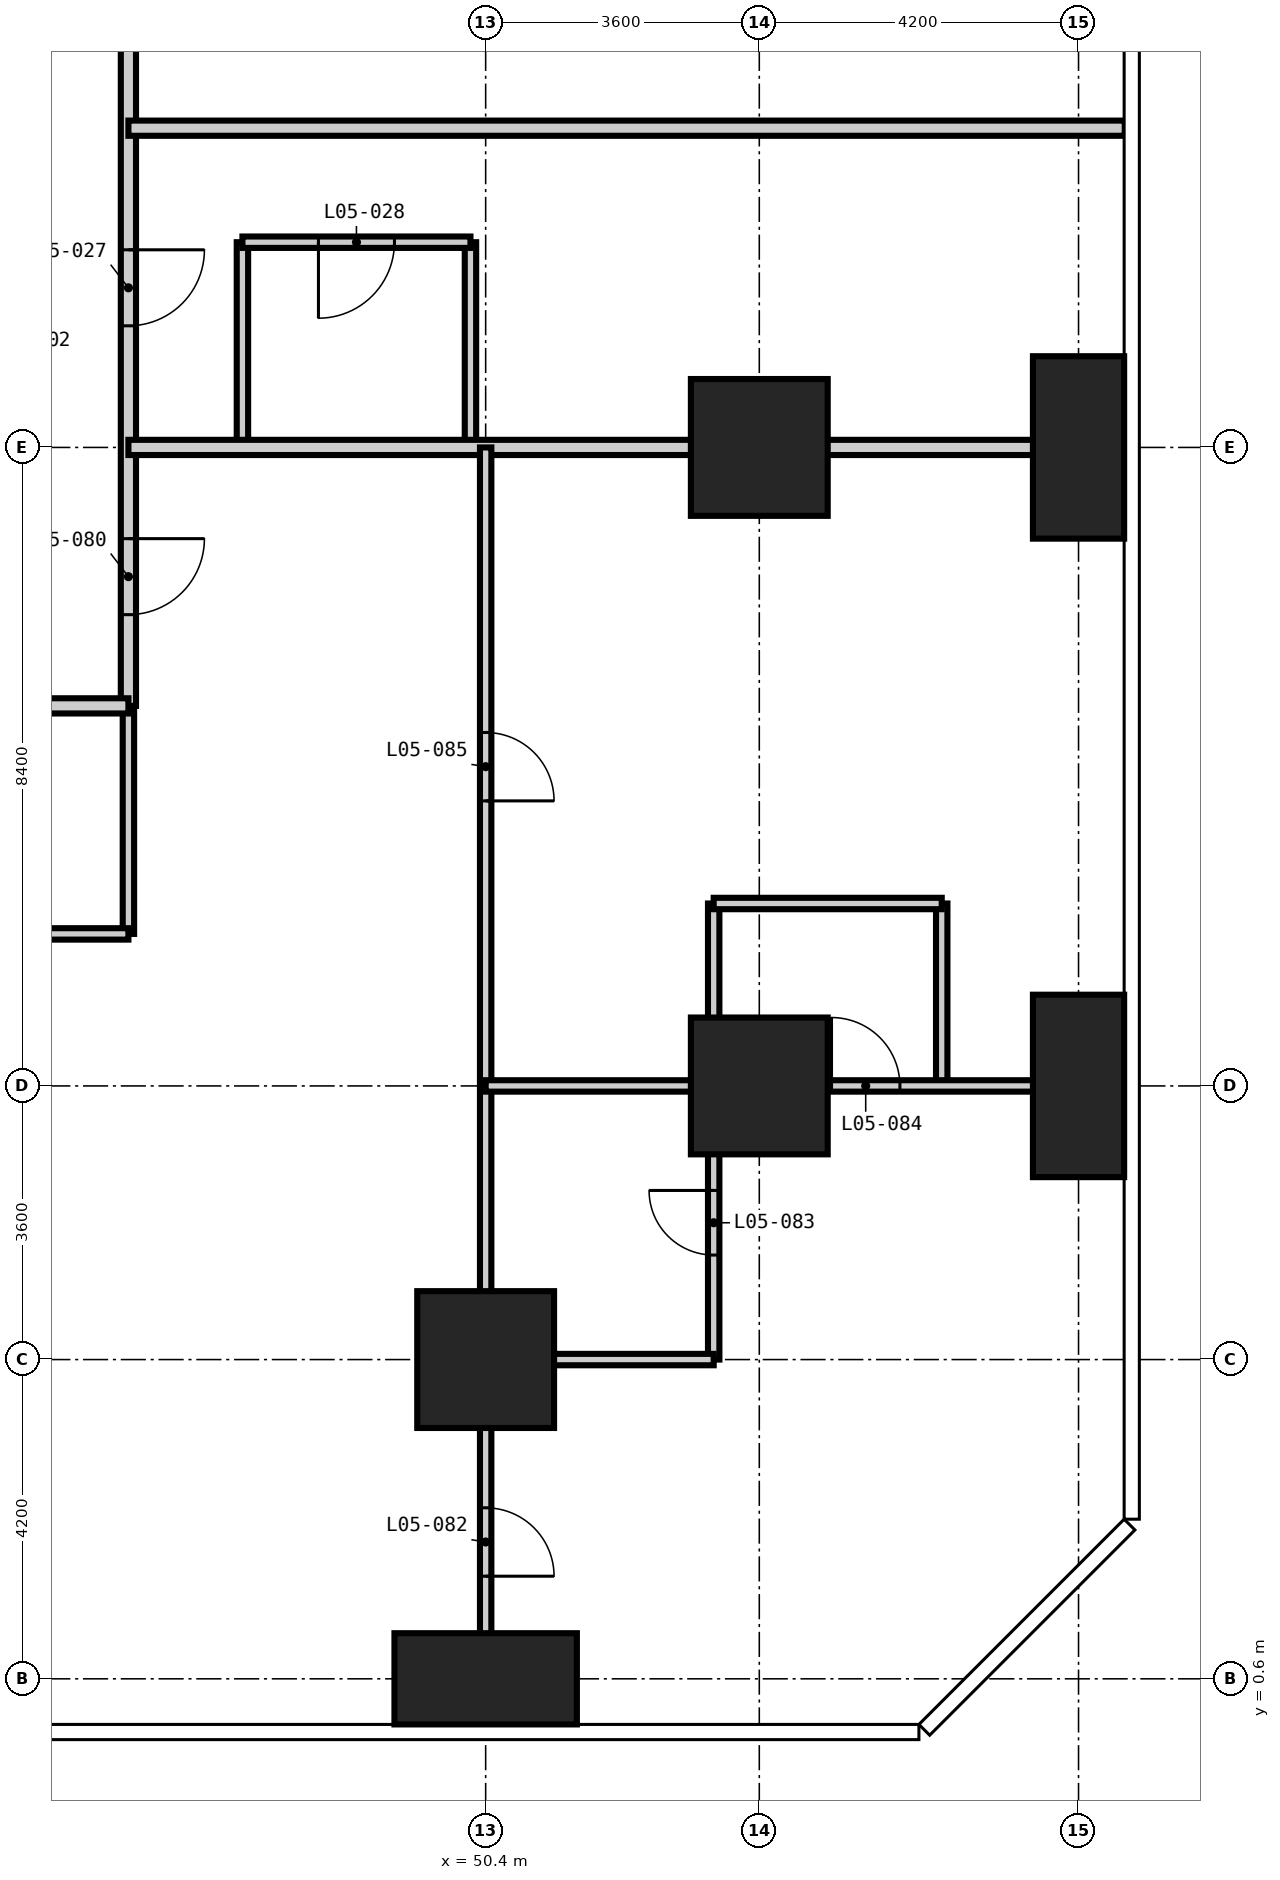
"""IFC4 building model, lengths in metres.
Left out: names, types, materials, properties, quantities, classifications, styles, units other than length and angle.
Written with IfcOpenShell. Run it as: python <this file> out.ifc"""

import sys

from ifc_helpers import new_model, si_unit, direction, frame, frame_2d, origin, origin_2d, place, context, subcontext, project, spatial, rectangle, extrude, element, fill, save


model = new_model("IFC4")
c1 = context("Model", 3, precision=1e-05, world=origin(), true_north=direction((0.0, 1.0)))
c2 = subcontext(c1, "Body", "Model", "MODEL_VIEW")
j1 = project(units=[si_unit("LENGTHUNIT", "METRE"), si_unit("PLANEANGLEUNIT", "RADIAN")], contexts=[c1])
p1 = place(None, origin())
s1 = spatial("IfcSite", under=j1, at=p1, CompositionType="ELEMENT")
p2 = place(p1, origin())
s2 = spatial("IfcBuilding", under=s1, at=p2, CompositionType="ELEMENT")
p3 = place(p2, frame((0.0, 0.0, 27.0)))
s3 = spatial("IfcBuildingStorey", under=s2, at=p3, CompositionType="ELEMENT", Elevation=27.0)
p4 = place(p3, frame((50.4, 0.6, -0.35), z_axis=(0.0, 0.0, 1.0), x_axis=(1.0, 0.0, 0.0)))
e1 = element("IfcColumn", 1, at=p4, inside=s3, PredefinedType="COLUMN", context=c2, shape_type="SweptSolid", body=[
    extrude(rectangle(XDim=2.4, YDim=1.2, at=origin_2d()), origin(), (0.0, 0.0, 1.0), 3.6),
])
for number, where, z_axis, x_axis in (
    (2, (50.4, 4.8, -0.35), (0.0, 0.0, 1.0), (1.0, 0.0, 0.0)),
    (3, (54.0, 8.4, -0.35), (0.0, 0.0, 1.0), (1.0, 0.0, 0.0)),
    (4, (54.0, 16.8, -0.35), (0.0, 0.0, 1.0), (1.0, 0.0, 0.0)),
):
    element("IfcColumn", number, at=place(p3, frame(where, z_axis=z_axis, x_axis=x_axis)), inside=s3, PredefinedType="COLUMN", context=c2, shape_type="SweptSolid", body=[
        extrude(rectangle(XDim=1.8, YDim=1.8, at=origin_2d()), origin(), (0.0, 0.0, 1.0), 3.6),
    ])
for number, where, z_axis, x_axis in (
    (5, (58.2, 8.4, -0.35), (0.0, 0.0, 1.0), (1.0, 0.0, 0.0)),
    (6, (58.2, 16.8, -0.35), (0.0, 0.0, 1.0), (1.0, 0.0, 0.0)),
):
    element("IfcColumn", number, at=place(p3, frame(where, z_axis=z_axis, x_axis=x_axis)), inside=s3, PredefinedType="COLUMN", context=c2, shape_type="SweptSolid", body=[
        extrude(rectangle(XDim=1.2, YDim=2.4, at=origin_2d()), origin(), (0.0, 0.0, 1.0), 3.6),
    ])
p5 = place(p3, frame((45.7, 10.4, 0.0), z_axis=(0.0, 0.0, 1.0), x_axis=(0.0, 1.0, 0.0)))
e7 = element("IfcWall", 7, at=p5, inside=s3, PredefinedType="PARTITIONING", context=c2, shape_type="SweptSolid", body=[
    extrude(rectangle(XDim=3.0, YDim=0.15, at=frame_2d((1.5, 0.0))), origin(), (0.0, 0.0, 1.0), 3.25),
])
for number, where, z_axis, x_axis in (
    (8, (47.2, 16.8, 0.0), (0.0, 0.0, 1.0), (0.0, 1.0, 0.0)),
    (9, (50.2, 16.8, 0.0), (0.0, 0.0, 1.0), (0.0, 1.0, 0.0)),
):
    element("IfcWall", number, at=place(p3, frame(where, z_axis=z_axis, x_axis=x_axis)), inside=s3, PredefinedType="PARTITIONING", context=c2, shape_type="SweptSolid", body=[
        extrude(rectangle(XDim=2.7, YDim=0.15, at=frame_2d((1.35, 0.0))), origin(), (0.0, 0.0, 1.0), 3.25),
    ])
p6 = place(p3, frame((53.4, 4.8, 0.0), z_axis=(0.0, 0.0, 1.0), x_axis=(0.0, 1.0, 0.0)))
e10 = element("IfcWall", 10, at=p6, inside=s3, PredefinedType="PARTITIONING", context=c2, shape_type="SweptSolid", body=[
    extrude(rectangle(XDim=3.6, YDim=0.15, at=frame_2d((1.8, 0.0))), origin(), (0.0, 0.0, 1.0), 3.25),
])
p7 = place(p6, frame((1.375, 0.0, 0.0)))
e11 = element("IfcOpeningElement", 11, at=p7, cuts=e10, PredefinedType="OPENING", context=c2, shape_type="SweptSolid", body=[
    extrude(rectangle(XDim=0.85, YDim=2.1, at=frame_2d((0.425, 1.05))), frame((0.0, 0.085, 0.0), z_axis=(0.0, -1.0, 0.0), x_axis=(1.0, 0.0, 0.0)), (0.0, 0.0, 1.0), 0.17),
])
p8 = place(p3, frame((50.4, 4.8, 0.0), z_axis=(0.0, 0.0, 1.0), x_axis=(1.0, 0.0, 0.0)))
e12 = element("IfcWall", 12, at=p8, inside=s3, PredefinedType="PARTITIONING", context=c2, shape_type="SweptSolid", body=[
    extrude(rectangle(XDim=3.0, YDim=0.15, at=frame_2d((1.5, 0.0))), origin(), (0.0, 0.0, 1.0), 3.25),
])
p9 = place(p3, frame((42.0, 10.4, 0.0), z_axis=(0.0, 0.0, 1.0), x_axis=(1.0, 0.0, 0.0)))
e13 = element("IfcWall", 13, at=p9, inside=s3, PredefinedType="PARTITIONING", context=c2, shape_type="SweptSolid", body=[
    extrude(rectangle(XDim=3.7, YDim=0.15, at=frame_2d((1.85, 0.0))), origin(), (0.0, 0.0, 1.0), 3.25),
])
p10 = place(p9, frame((1.425, 0.0, 0.0)))
e14 = element("IfcOpeningElement", 14, at=p10, cuts=e13, PredefinedType="OPENING", context=c2, shape_type="SweptSolid", body=[
    extrude(rectangle(XDim=0.85, YDim=2.1, at=frame_2d((0.425, 1.05))), frame((0.0, 0.085, 0.0), z_axis=(0.0, -1.0, 0.0), x_axis=(1.0, 0.0, 0.0)), (0.0, 0.0, 1.0), 0.17),
])
p11 = place(p3, frame((47.2, 19.5, 0.0), z_axis=(0.0, 0.0, 1.0), x_axis=(1.0, 0.0, 0.0)))
e15 = element("IfcWall", 15, at=p11, inside=s3, PredefinedType="PARTITIONING", context=c2, shape_type="SweptSolid", body=[
    extrude(rectangle(XDim=3.0, YDim=0.15, at=frame_2d((1.5, 0.0))), origin(), (0.0, 0.0, 1.0), 3.25),
])
p12 = place(p11, frame((1.0, 0.0, 0.0)))
e16 = element("IfcOpeningElement", 16, at=p12, cuts=e15, PredefinedType="OPENING", context=c2, shape_type="SweptSolid", body=[
    extrude(rectangle(XDim=1.0, YDim=2.1, at=frame_2d((0.5, 1.05))), frame((0.0, 0.085, 0.0), z_axis=(0.0, -1.0, 0.0), x_axis=(1.0, 0.0, 0.0)), (0.0, 0.0, 1.0), 0.17),
])
p13 = place(p3, frame((45.7, 46.0, 0.0), z_axis=(0.0, 0.0, 1.0), x_axis=(0.0, -1.0, 0.0)))
e17 = element("IfcWall", 17, at=p13, inside=s3, PredefinedType="PARTITIONING", context=c2, shape_type="SweptSolid", body=[
    extrude(rectangle(XDim=32.6, YDim=0.2, at=frame_2d((16.3, 0.0))), origin(), (0.0, 0.0, 1.0), 3.25),
])
p14 = place(p13, frame((26.6, 0.0, 0.0)))
e18 = element("IfcOpeningElement", 18, at=p14, cuts=e17, PredefinedType="OPENING", context=c2, shape_type="SweptSolid", body=[
    extrude(rectangle(XDim=1.0, YDim=2.2, at=frame_2d((0.5, 1.1))), frame((0.0, 0.11, 0.0), z_axis=(0.0, -1.0, 0.0), x_axis=(1.0, 0.0, 0.0)), (0.0, 0.0, 1.0), 0.22),
])
p15 = place(p13, frame((22.4, 0.0, 0.0)))
e19 = element("IfcOpeningElement", 19, at=p15, cuts=e17, PredefinedType="OPENING", context=c2, shape_type="SweptSolid", body=[
    extrude(rectangle(XDim=1.0, YDim=2.2, at=frame_2d((0.5, 1.1))), frame((0.0, 0.11, 0.0), z_axis=(0.0, -1.0, 0.0), x_axis=(1.0, 0.0, 0.0)), (0.0, 0.0, 1.0), 0.22),
])
p16 = place(p13, frame((17.0, 0.0, 0.0)))
e20 = element("IfcOpeningElement", 20, at=p16, cuts=e17, PredefinedType="OPENING", context=c2, shape_type="SweptSolid", body=[
    extrude(rectangle(XDim=1.0, YDim=2.2, at=frame_2d((0.5, 1.1))), frame((0.0, 0.11, 0.0), z_axis=(0.0, -1.0, 0.0), x_axis=(1.0, 0.0, 0.0)), (0.0, 0.0, 1.0), 0.22),
])
p17 = place(p13, frame((15.2, 0.0, 0.0)))
e21 = element("IfcOpeningElement", 21, at=p17, cuts=e17, PredefinedType="OPENING", context=c2, shape_type="SweptSolid", body=[
    extrude(rectangle(XDim=1.0, YDim=2.2, at=frame_2d((0.5, 1.1))), frame((0.0, 0.11, 0.0), z_axis=(0.0, -1.0, 0.0), x_axis=(1.0, 0.0, 0.0)), (0.0, 0.0, 1.0), 0.22),
])
p18 = place(p13, frame((8.6, 0.0, 0.0)))
e22 = element("IfcOpeningElement", 22, at=p18, cuts=e17, PredefinedType="OPENING", context=c2, shape_type="SweptSolid", body=[
    extrude(rectangle(XDim=1.0, YDim=2.2, at=frame_2d((0.5, 1.1))), frame((0.0, 0.11, 0.0), z_axis=(0.0, -1.0, 0.0), x_axis=(1.0, 0.0, 0.0)), (0.0, 0.0, 1.0), 0.22),
])
p19 = place(p13, frame((6.8, 0.0, 0.0)))
e23 = element("IfcOpeningElement", 23, at=p19, cuts=e17, PredefinedType="OPENING", context=c2, shape_type="SweptSolid", body=[
    extrude(rectangle(XDim=1.0, YDim=2.2, at=frame_2d((0.5, 1.1))), frame((0.0, 0.11, 0.0), z_axis=(0.0, -1.0, 0.0), x_axis=(1.0, 0.0, 0.0)), (0.0, 0.0, 1.0), 0.22),
])
p20 = place(p13, frame((30.4, 0.0, 0.0)))
e24 = element("IfcOpeningElement", 24, at=p20, cuts=e17, PredefinedType="OPENING", context=c2, shape_type="SweptSolid", body=[
    extrude(rectangle(XDim=1.0, YDim=2.2, at=frame_2d((0.5, 1.1))), frame((0.0, 0.11, 0.0), z_axis=(0.0, -1.0, 0.0), x_axis=(1.0, 0.0, 0.0)), (0.0, 0.0, 1.0), 0.22),
])
p21 = place(p13, frame((1.5, 0.0, 0.0)))
e25 = element("IfcOpeningElement", 25, at=p21, cuts=e17, PredefinedType="OPENING", context=c2, shape_type="SweptSolid", body=[
    extrude(rectangle(XDim=1.0, YDim=2.2, at=frame_2d((0.5, 1.1))), frame((0.0, 0.11, 0.0), z_axis=(0.0, -1.0, 0.0), x_axis=(1.0, 0.0, 0.0)), (0.0, 0.0, 1.0), 0.22),
])
p22 = place(p3, frame((45.7, 13.4, 0.0), z_axis=(0.0, 0.0, 1.0), x_axis=(-1.0, 0.0, 0.0)))
e26 = element("IfcWall", 26, at=p22, inside=s3, PredefinedType="PARTITIONING", context=c2, shape_type="SweptSolid", body=[
    extrude(rectangle(XDim=32.3, YDim=0.2, at=frame_2d((16.15, 0.0))), origin(), (0.0, 0.0, 1.0), 3.25),
])
p23 = place(p22, frame((25.1, 0.0, 0.0)))
e27 = element("IfcOpeningElement", 27, at=p23, cuts=e26, PredefinedType="OPENING", context=c2, shape_type="SweptSolid", body=[
    extrude(rectangle(XDim=1.0, YDim=2.2, at=frame_2d((0.5, 1.1))), frame((0.0, 0.11, 0.0), z_axis=(0.0, -1.0, 0.0), x_axis=(1.0, 0.0, 0.0)), (0.0, 0.0, 1.0), 0.22),
])
p24 = place(p22, frame((23.3, 0.0, 0.0)))
e28 = element("IfcOpeningElement", 28, at=p24, cuts=e26, PredefinedType="OPENING", context=c2, shape_type="SweptSolid", body=[
    extrude(rectangle(XDim=1.0, YDim=2.2, at=frame_2d((0.5, 1.1))), frame((0.0, 0.11, 0.0), z_axis=(0.0, -1.0, 0.0), x_axis=(1.0, 0.0, 0.0)), (0.0, 0.0, 1.0), 0.22),
])
p25 = place(p22, frame((16.7, 0.0, 0.0)))
e29 = element("IfcOpeningElement", 29, at=p25, cuts=e26, PredefinedType="OPENING", context=c2, shape_type="SweptSolid", body=[
    extrude(rectangle(XDim=1.0, YDim=2.2, at=frame_2d((0.5, 1.1))), frame((0.0, 0.11, 0.0), z_axis=(0.0, -1.0, 0.0), x_axis=(1.0, 0.0, 0.0)), (0.0, 0.0, 1.0), 0.22),
])
p26 = place(p22, frame((14.9, 0.0, 0.0)))
e30 = element("IfcOpeningElement", 30, at=p26, cuts=e26, PredefinedType="OPENING", context=c2, shape_type="SweptSolid", body=[
    extrude(rectangle(XDim=1.0, YDim=2.2, at=frame_2d((0.5, 1.1))), frame((0.0, 0.11, 0.0), z_axis=(0.0, -1.0, 0.0), x_axis=(1.0, 0.0, 0.0)), (0.0, 0.0, 1.0), 0.22),
])
p27 = place(p22, frame((8.3, 0.0, 0.0)))
e31 = element("IfcOpeningElement", 31, at=p27, cuts=e26, PredefinedType="OPENING", context=c2, shape_type="SweptSolid", body=[
    extrude(rectangle(XDim=1.0, YDim=2.2, at=frame_2d((0.5, 1.1))), frame((0.0, 0.11, 0.0), z_axis=(0.0, -1.0, 0.0), x_axis=(1.0, 0.0, 0.0)), (0.0, 0.0, 1.0), 0.22),
])
p28 = place(p22, frame((6.5, 0.0, 0.0)))
e32 = element("IfcOpeningElement", 32, at=p28, cuts=e26, PredefinedType="OPENING", context=c2, shape_type="SweptSolid", body=[
    extrude(rectangle(XDim=1.0, YDim=2.2, at=frame_2d((0.5, 1.1))), frame((0.0, 0.11, 0.0), z_axis=(0.0, -1.0, 0.0), x_axis=(1.0, 0.0, 0.0)), (0.0, 0.0, 1.0), 0.22),
])
for number, where, z_axis, x_axis in (
    (33, (45.7, 16.8, 0.0), (0.0, 0.0, 1.0), (1.0, 0.0, 0.0)),
    (34, (45.7, 21.0, 0.0), (0.0, 0.0, 1.0), (1.0, 0.0, 0.0)),
):
    element("IfcWall", number, at=place(p3, frame(where, z_axis=z_axis, x_axis=x_axis)), inside=s3, PredefinedType="PARTITIONING", context=c2, shape_type="SweptSolid", body=[
        extrude(rectangle(XDim=13.108, YDim=0.2, at=frame_2d((6.554, 0.0))), origin(), (0.0, 0.0, 1.0), 3.25),
    ])
p29 = place(p3, frame((50.4, -0.008, 0.0), z_axis=(0.0, 0.0, 1.0), x_axis=(0.0, 1.0, 0.0)))
e35 = element("IfcWall", 35, at=p29, inside=s3, PredefinedType="PARTITIONING", context=c2, shape_type="SweptSolid", body=[
    extrude(rectangle(XDim=16.808, YDim=0.15, at=frame_2d((8.404, 0.0))), origin(), (0.0, 0.0, 1.0), 3.25),
])
p30 = place(p29, frame((1.958, 0.0, 0.0)))
e36 = element("IfcOpeningElement", 36, at=p30, cuts=e35, PredefinedType="OPENING", context=c2, shape_type="SweptSolid", body=[
    extrude(rectangle(XDim=0.9, YDim=2.1, at=frame_2d((0.45, 1.05))), frame((0.0, 0.085, 0.0), z_axis=(0.0, -1.0, 0.0), x_axis=(1.0, 0.0, 0.0)), (0.0, 0.0, 1.0), 0.17),
])
p31 = place(p29, frame((12.158, 0.0, 0.0)))
e37 = element("IfcOpeningElement", 37, at=p31, cuts=e35, PredefinedType="OPENING", context=c2, shape_type="SweptSolid", body=[
    extrude(rectangle(XDim=0.9, YDim=2.1, at=frame_2d((0.45, 1.05))), frame((0.0, 0.085, 0.0), z_axis=(0.0, -1.0, 0.0), x_axis=(1.0, 0.0, 0.0)), (0.0, 0.0, 1.0), 0.17),
])
for number, where, z_axis, x_axis in (
    (38, (53.4, 8.4, 0.0), (0.0, 0.0, 1.0), (0.0, 1.0, 0.0)),
    (39, (56.4, 8.4, 0.0), (0.0, 0.0, 1.0), (0.0, 1.0, 0.0)),
):
    element("IfcWall", number, at=place(p3, frame(where, z_axis=z_axis, x_axis=x_axis)), inside=s3, PredefinedType="PARTITIONING", context=c2, shape_type="SweptSolid", body=[
        extrude(rectangle(XDim=2.4, YDim=0.15, at=frame_2d((1.2, 0.0))), origin(), (0.0, 0.0, 1.0), 3.25),
    ])
p32 = place(p3, frame((50.4, 8.4, 0.0), z_axis=(0.0, 0.0, 1.0), x_axis=(1.0, 0.0, 0.0)))
e40 = element("IfcWall", 40, at=p32, inside=s3, PredefinedType="PARTITIONING", context=c2, shape_type="SweptSolid", body=[
    extrude(rectangle(XDim=8.408, YDim=0.15, at=frame_2d((4.204, 0.0))), origin(), (0.0, 0.0, 1.0), 3.25),
])
p33 = place(p32, frame((4.55, 0.0, 0.0)))
e41 = element("IfcOpeningElement", 41, at=p33, cuts=e40, PredefinedType="OPENING", context=c2, shape_type="SweptSolid", body=[
    extrude(rectangle(XDim=0.9, YDim=2.1, at=frame_2d((0.45, 1.05))), frame((0.0, 0.085, 0.0), z_axis=(0.0, -1.0, 0.0), x_axis=(1.0, 0.0, 0.0)), (0.0, 0.0, 1.0), 0.17),
])
p34 = place(p3, frame((53.4, 10.8, 0.0), z_axis=(0.0, 0.0, 1.0), x_axis=(1.0, 0.0, 0.0)))
e42 = element("IfcWall", 42, at=p34, inside=s3, PredefinedType="PARTITIONING", context=c2, shape_type="SweptSolid", body=[
    extrude(rectangle(XDim=3.0, YDim=0.15, at=frame_2d((1.5, 0.0))), origin(), (0.0, 0.0, 1.0), 3.25),
])
p35 = place(p14, origin())
e43 = element("IfcDoor", 43, at=p35, inside=s3, OperationType="SINGLE_SWING_LEFT", PredefinedType="DOOR", context=c2, shape_type="SweptSolid", body=[
    extrude(rectangle(XDim=1.0, YDim=2.2, at=frame_2d((0.5, 1.1))), frame((0.0, 0.025, 0.0), z_axis=(0.0, -1.0, 0.0), x_axis=(1.0, 0.0, 0.0)), (0.0, 0.0, 1.0), 0.05),
])
fill(e18, e43)
p36 = place(p12, frame((1.0, 0.0, 0.0), z_axis=(0.0, 0.0, 1.0), x_axis=(-1.0, 0.0, 0.0)))
e44 = element("IfcDoor", 44, at=p36, inside=s3, OperationType="SINGLE_SWING_RIGHT", PredefinedType="DOOR", context=c2, shape_type="SweptSolid", body=[
    extrude(rectangle(XDim=1.0, YDim=2.1, at=frame_2d((0.5, 1.05))), frame((0.0, 0.025, 0.0), z_axis=(0.0, -1.0, 0.0), x_axis=(1.0, 0.0, 0.0)), (0.0, 0.0, 1.0), 0.05),
])
fill(e16, e44)
p37 = place(p20, origin())
e45 = element("IfcDoor", 45, at=p37, inside=s3, OperationType="SINGLE_SWING_LEFT", PredefinedType="DOOR", context=c2, shape_type="SweptSolid", body=[
    extrude(rectangle(XDim=1.0, YDim=2.2, at=frame_2d((0.5, 1.1))), frame((0.0, 0.025, 0.0), z_axis=(0.0, -1.0, 0.0), x_axis=(1.0, 0.0, 0.0)), (0.0, 0.0, 1.0), 0.05),
])
fill(e24, e45)
p38 = place(p30, frame((0.9, 0.0, 0.0), z_axis=(0.0, 0.0, 1.0), x_axis=(-1.0, 0.0, 0.0)))
e46 = element("IfcDoor", 46, at=p38, inside=s3, OperationType="SINGLE_SWING_RIGHT", PredefinedType="DOOR", context=c2, shape_type="SweptSolid", body=[
    extrude(rectangle(XDim=0.9, YDim=2.1, at=frame_2d((0.45, 1.05))), frame((0.0, 0.025, 0.0), z_axis=(0.0, -1.0, 0.0), x_axis=(1.0, 0.0, 0.0)), (0.0, 0.0, 1.0), 0.05),
])
fill(e36, e46)
p39 = place(p7, origin())
e47 = element("IfcDoor", 47, at=p39, inside=s3, OperationType="SINGLE_SWING_RIGHT", PredefinedType="DOOR", context=c2, shape_type="SweptSolid", body=[
    extrude(rectangle(XDim=0.85, YDim=2.1, at=frame_2d((0.425, 1.05))), frame((0.0, 0.025, 0.0), z_axis=(0.0, -1.0, 0.0), x_axis=(1.0, 0.0, 0.0)), (0.0, 0.0, 1.0), 0.05),
])
fill(e11, e47)
p40 = place(p33, origin())
e48 = element("IfcDoor", 48, at=p40, inside=s3, OperationType="SINGLE_SWING_LEFT", PredefinedType="DOOR", context=c2, shape_type="SweptSolid", body=[
    extrude(rectangle(XDim=0.9, YDim=2.1, at=frame_2d((0.45, 1.05))), frame((0.0, 0.025, 0.0), z_axis=(0.0, -1.0, 0.0), x_axis=(1.0, 0.0, 0.0)), (0.0, 0.0, 1.0), 0.05),
])
fill(e41, e48)
p41 = place(p31, frame((0.9, 0.0, 0.0), z_axis=(0.0, 0.0, 1.0), x_axis=(-1.0, 0.0, 0.0)))
e49 = element("IfcDoor", 49, at=p41, inside=s3, OperationType="SINGLE_SWING_RIGHT", PredefinedType="DOOR", context=c2, shape_type="SweptSolid", body=[
    extrude(rectangle(XDim=0.9, YDim=2.1, at=frame_2d((0.45, 1.05))), frame((0.0, 0.025, 0.0), z_axis=(0.0, -1.0, 0.0), x_axis=(1.0, 0.0, 0.0)), (0.0, 0.0, 1.0), 0.05),
])
fill(e37, e49)
save(model, sys.argv[1])
